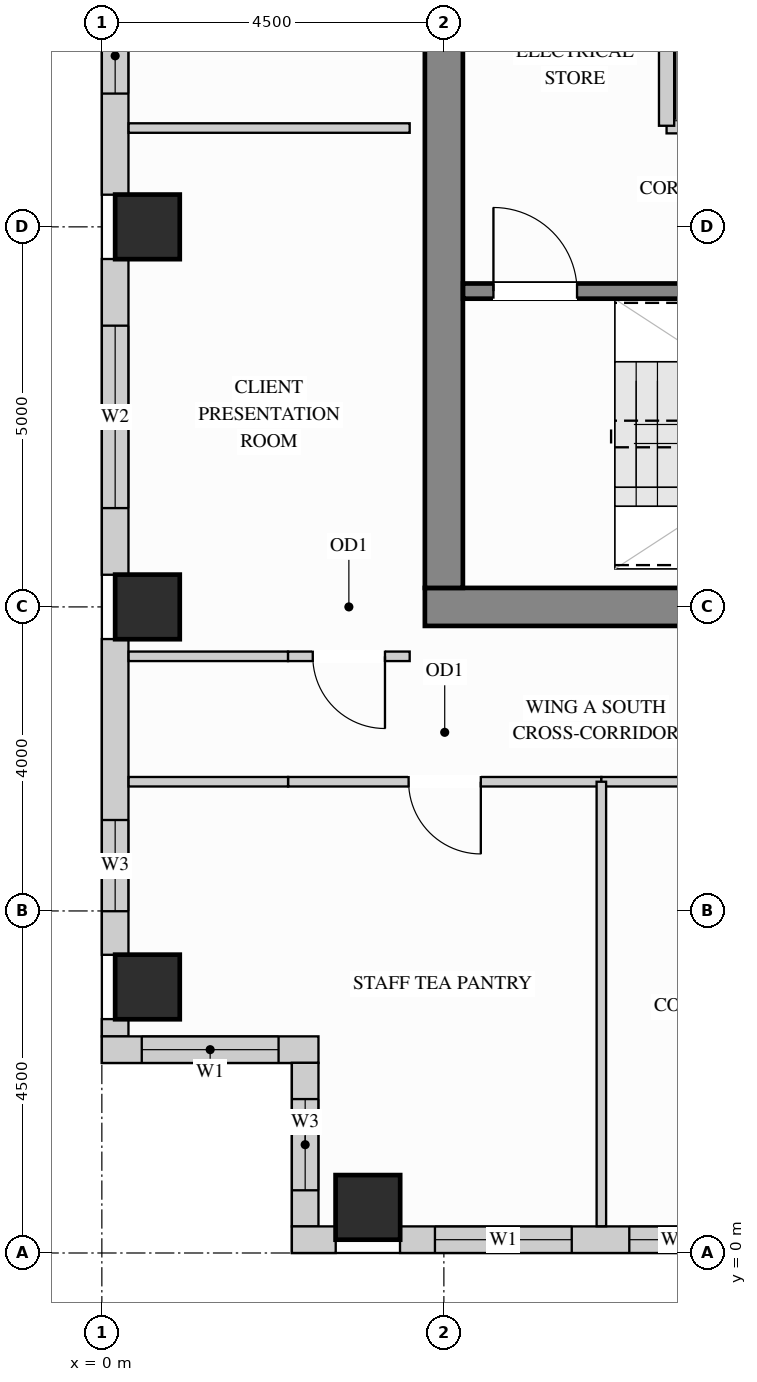
"""IFC4 building model, lengths in metres.
Left out: names, types, materials, properties, quantities, classifications, styles, units other than length and angle.
Written with IfcOpenShell. Run it as: python <this file> out.ifc"""

import sys

from ifc_helpers import new_model, si_unit, direction, frame, frame_2d, origin, origin_2d, place, context, subcontext, project, spatial, rectangle, extrude, source, transform, mapped, element, fill, save


model = new_model("IFC4")
c1 = context("Model", 3, precision=1e-05, world=origin(), true_north=direction((0.0, 1.0)))
c2 = subcontext(c1, "Body", "Model", "MODEL_VIEW")
j1 = project(units=[si_unit("LENGTHUNIT", "METRE"), si_unit("PLANEANGLEUNIT", "RADIAN")], contexts=[c1])
p1 = place(None, origin())
s1 = spatial("IfcSite", under=j1, at=p1, CompositionType="ELEMENT")
p2 = place(p1, origin())
s2 = spatial("IfcBuilding", under=s1, at=p2, CompositionType="ELEMENT")
p3 = place(p2, frame((0.0, 0.0, 219.6)))
s3 = spatial("IfcBuildingStorey", under=s2, at=p3, CompositionType="ELEMENT", Elevation=219.6)
m1 = source(origin(), c2, "Body", "SweptSolid", [
    extrude(rectangle(XDim=0.85, YDim=0.85, at=origin_2d()), origin(), (0.0, 0.0, 1.0), 3.4),
])
for number, where, z_axis, x_axis in (
    (1, (3.5, 0.6, 0.0), (0.0, 0.0, 1.0), (1.0, 0.0, 0.0)),
    (2, (0.6, 13.5, 0.0), (0.0, 0.0, 1.0), (1.0, 0.0, 0.0)),
    (3, (0.6, 3.5, 0.0), (0.0, 0.0, 1.0), (1.0, 0.0, 0.0)),
    (4, (0.6, 8.5, 0.0), (0.0, 0.0, 1.0), (1.0, 0.0, 0.0)),
):
    element("IfcColumn", number, at=place(p3, frame(where, z_axis=z_axis, x_axis=x_axis)), inside=s3, PredefinedType="COLUMN", context=c2, shape_type="MappedRepresentation", body=[
        mapped(m1, transform((0.0, 0.0, 0.0), x_axis=(1.0, 0.0, 0.0), y_axis=(0.0, 1.0, 0.0), z_axis=(0.0, 0.0, 1.0))),
    ])
m2 = source(origin(), c2, "Body", "SweptSolid", [
    extrude(rectangle(XDim=10.5, YDim=0.5, at=frame_2d((5.25, 0.0))), origin(), (0.0, 0.0, 1.0), 3.4),
])
p4 = place(p3, frame((4.25, 8.5, 0.0), z_axis=(0.0, 0.0, 1.0), x_axis=(1.0, 0.0, 0.0)))
e5 = element("IfcWall", 5, at=p4, inside=s3, PredefinedType="SHEAR", context=c2, shape_type="MappedRepresentation", body=[
    mapped(m2, transform((0.0, 0.0, 0.0), x_axis=(1.0, 0.0, 0.0), y_axis=(0.0, 1.0, 0.0), z_axis=(0.0, 0.0, 1.0))),
])
m3 = source(origin(), c2, "Body", "SweptSolid", [
    extrude(rectangle(XDim=20.5, YDim=0.5, at=frame_2d((10.25, 0.0))), origin(), (0.0, 0.0, 1.0), 3.4),
])
p5 = place(p3, frame((4.5, 8.75, 0.0), z_axis=(0.0, 0.0, 1.0), x_axis=(0.0, 1.0, 0.0)))
e6 = element("IfcWall", 6, at=p5, inside=s3, PredefinedType="SHEAR", context=c2, shape_type="MappedRepresentation", body=[
    mapped(m3, transform((0.0, 0.0, 0.0), x_axis=(1.0, 0.0, 0.0), y_axis=(0.0, 1.0, 0.0), z_axis=(0.0, 0.0, 1.0))),
])
p6 = place(p3, frame((0.175, 17.577, 0.0), z_axis=(0.0, 0.0, 1.0), x_axis=(0.0, -1.0, 0.0)))
e7 = element("IfcWall", 7, at=p6, inside=s3, PredefinedType="SOLIDWALL", context=c2, shape_type="SweptSolid", body=[
    extrude(rectangle(XDim=3.654, YDim=0.35, at=frame_2d((1.827, 0.0))), origin(), (0.0, 0.0, 1.0), 3.385),
])
p7 = place(p6, frame((0.523, 0.0, 0.78)))
e8 = element("IfcOpeningElement", 8, at=p7, cuts=e7, PredefinedType="OPENING", context=c2, shape_type="SweptSolid", body=[
    extrude(rectangle(XDim=1.8, YDim=2.1, at=frame_2d((0.9, 1.05))), frame((0.0, 0.185, 0.0), z_axis=(0.0, -1.0, 0.0), x_axis=(1.0, 0.0, 0.0)), (0.0, 0.0, 1.0), 0.37),
])
p8 = place(p3, frame((0.175, 13.077, 0.0), z_axis=(0.0, 0.0, 1.0), x_axis=(0.0, -1.0, 0.0)))
e9 = element("IfcWall", 9, at=p8, inside=s3, PredefinedType="SOLIDWALL", context=c2, shape_type="SweptSolid", body=[
    extrude(rectangle(XDim=4.154, YDim=0.35, at=frame_2d((2.077, 0.0))), origin(), (0.0, 0.0, 1.0), 3.385),
])
p9 = place(p8, frame((0.877, 0.0, 0.78)))
e10 = element("IfcOpeningElement", 10, at=p9, cuts=e9, PredefinedType="OPENING", context=c2, shape_type="SweptSolid", body=[
    extrude(rectangle(XDim=2.4, YDim=2.1, at=frame_2d((1.2, 1.05))), frame((0.0, 0.185, 0.0), z_axis=(0.0, -1.0, 0.0), x_axis=(1.0, 0.0, 0.0)), (0.0, 0.0, 1.0), 0.37),
])
p10 = place(p3, frame((0.175, 8.077, 0.0), z_axis=(0.0, 0.0, 1.0), x_axis=(0.0, -1.0, 0.0)))
e11 = element("IfcWall", 11, at=p10, inside=s3, PredefinedType="SOLIDWALL", context=c2, shape_type="SweptSolid", body=[
    extrude(rectangle(XDim=4.154, YDim=0.35, at=frame_2d((2.077, 0.0))), origin(), (0.0, 0.0, 1.0), 3.385),
])
p11 = place(p10, frame((2.381, 0.0, 0.78)))
e12 = element("IfcOpeningElement", 12, at=p11, cuts=e11, PredefinedType="OPENING", context=c2, shape_type="SweptSolid", body=[
    extrude(rectangle(XDim=1.2, YDim=2.1, at=frame_2d((0.6, 1.05))), frame((0.0, 0.185, 0.0), z_axis=(0.0, -1.0, 0.0), x_axis=(1.0, 0.0, 0.0)), (0.0, 0.0, 1.0), 0.37),
])
m4 = source(origin(), c2, "Body", "SweptSolid", [
    extrude(rectangle(XDim=0.229, YDim=0.35, at=frame_2d((0.115, 0.0))), origin(), (0.0, 0.0, 1.0), 3.385),
])
p12 = place(p3, frame((0.175, 3.077, 0.0), z_axis=(0.0, 0.0, 1.0), x_axis=(0.0, -1.0, 0.0)))
e13 = element("IfcWall", 13, at=p12, inside=s3, PredefinedType="SOLIDWALL", context=c2, shape_type="MappedRepresentation", body=[
    mapped(m4, transform((0.0, 0.0, 0.0), x_axis=(1.0, 0.0, 0.0), y_axis=(0.0, 1.0, 0.0), z_axis=(0.0, 0.0, 1.0))),
])
p13 = place(p3, frame((0.0, 2.675, 0.0), z_axis=(0.0, 0.0, 1.0), x_axis=(1.0, 0.0, 0.0)))
e14 = element("IfcWall", 14, at=p13, inside=s3, PredefinedType="SOLIDWALL", context=c2, shape_type="SweptSolid", body=[
    extrude(rectangle(XDim=2.85, YDim=0.35, at=frame_2d((1.425, 0.0))), origin(), (0.0, 0.0, 1.0), 3.385),
])
p14 = place(p13, frame((0.525, 0.0, 0.78)))
e15 = element("IfcOpeningElement", 15, at=p14, cuts=e14, PredefinedType="OPENING", context=c2, shape_type="SweptSolid", body=[
    extrude(rectangle(XDim=1.8, YDim=2.1, at=frame_2d((0.9, 1.05))), frame((0.0, 0.185, 0.0), z_axis=(0.0, -1.0, 0.0), x_axis=(1.0, 0.0, 0.0)), (0.0, 0.0, 1.0), 0.37),
])
p15 = place(p3, frame((2.675, 2.502, 0.0), z_axis=(0.0, 0.0, 1.0), x_axis=(0.0, -1.0, 0.0)))
e16 = element("IfcWall", 16, at=p15, inside=s3, PredefinedType="SOLIDWALL", context=c2, shape_type="SweptSolid", body=[
    extrude(rectangle(XDim=2.154, YDim=0.35, at=frame_2d((1.077, 0.0))), origin(), (0.0, 0.0, 1.0), 3.385),
])
p16 = place(p15, frame((0.477, 0.0, 0.78)))
e17 = element("IfcOpeningElement", 17, at=p16, cuts=e16, PredefinedType="OPENING", context=c2, shape_type="SweptSolid", body=[
    extrude(rectangle(XDim=1.2, YDim=2.1, at=frame_2d((0.6, 1.05))), frame((0.0, 0.185, 0.0), z_axis=(0.0, -1.0, 0.0), x_axis=(1.0, 0.0, 0.0)), (0.0, 0.0, 1.0), 0.37),
])
m5 = source(origin(), c2, "Body", "SweptSolid", [
    extrude(rectangle(XDim=0.577, YDim=0.35, at=frame_2d((0.289, 0.0))), origin(), (0.0, 0.0, 1.0), 3.385),
])
p17 = place(p3, frame((2.5, 0.175, 0.0), z_axis=(0.0, 0.0, 1.0), x_axis=(1.0, 0.0, 0.0)))
e18 = element("IfcWall", 18, at=p17, inside=s3, PredefinedType="SOLIDWALL", context=c2, shape_type="MappedRepresentation", body=[
    mapped(m5, transform((0.0, 0.0, 0.0), x_axis=(1.0, 0.0, 0.0), y_axis=(0.0, 1.0, 0.0), z_axis=(0.0, 0.0, 1.0))),
])
p18 = place(p3, frame((3.923, 0.175, 0.0), z_axis=(0.0, 0.0, 1.0), x_axis=(1.0, 0.0, 0.0)))
e19 = element("IfcWall", 19, at=p18, inside=s3, PredefinedType="SOLIDWALL", context=c2, shape_type="SweptSolid", body=[
    extrude(rectangle(XDim=4.654, YDim=0.35, at=frame_2d((2.327, 0.0))), origin(), (0.0, 0.0, 1.0), 3.385),
])
p19 = place(p18, frame((0.459, 0.0, 0.78)))
e20 = element("IfcOpeningElement", 20, at=p19, cuts=e19, PredefinedType="OPENING", context=c2, shape_type="SweptSolid", body=[
    extrude(rectangle(XDim=1.8, YDim=2.1, at=frame_2d((0.9, 1.05))), frame((0.0, 0.185, 0.0), z_axis=(0.0, -1.0, 0.0), x_axis=(1.0, 0.0, 0.0)), (0.0, 0.0, 1.0), 0.37),
])
p20 = place(p18, frame((3.017, 0.0, 0.78)))
e21 = element("IfcOpeningElement", 21, at=p20, cuts=e19, PredefinedType="OPENING", context=c2, shape_type="SweptSolid", body=[
    extrude(rectangle(XDim=1.2, YDim=2.1, at=frame_2d((0.6, 1.05))), frame((0.0, 0.185, 0.0), z_axis=(0.0, -1.0, 0.0), x_axis=(1.0, 0.0, 0.0)), (0.0, 0.0, 1.0), 0.37),
])
m6 = source(origin(), c2, "Body", "SweptSolid", [
    extrude(rectangle(XDim=2.098, YDim=0.125, at=frame_2d((1.049, 0.0))), origin(), (0.0, 0.0, 1.0), 3.385),
])
p21 = place(p3, frame((0.352, 7.85, 0.0), z_axis=(0.0, 0.0, 1.0), x_axis=(1.0, 0.0, 0.0)))
e22 = element("IfcWall", 22, at=p21, inside=s3, PredefinedType="PARTITIONING", context=c2, shape_type="MappedRepresentation", body=[
    mapped(m6, transform((0.0, 0.0, 0.0), x_axis=(1.0, 0.0, 0.0), y_axis=(0.0, 1.0, 0.0), z_axis=(0.0, 0.0, 1.0))),
])
p22 = place(p3, frame((2.45, 7.85, 0.0), z_axis=(0.0, 0.0, 1.0), x_axis=(1.0, 0.0, 0.0)))
e23 = element("IfcWall", 23, at=p22, inside=s3, PredefinedType="PARTITIONING", context=c2, shape_type="SweptSolid", body=[
    extrude(rectangle(XDim=1.6, YDim=0.125, at=frame_2d((0.8, 0.0))), origin(), (0.0, 0.0, 1.0), 3.385),
])
p23 = place(p22, frame((0.325, 0.0, 0.0)))
e24 = element("IfcOpeningElement", 24, at=p23, cuts=e23, PredefinedType="OPENING", context=c2, shape_type="SweptSolid", body=[
    extrude(rectangle(XDim=0.95, YDim=2.15, at=frame_2d((0.475, 1.075))), frame((0.0, 0.073, 0.0), z_axis=(0.0, -1.0, 0.0), x_axis=(1.0, 0.0, 0.0)), (0.0, 0.0, 1.0), 0.145),
])
p24 = place(p3, frame((2.45, 6.2, 0.0), z_axis=(0.0, 0.0, 1.0), x_axis=(1.0, 0.0, 0.0)))
e25 = element("IfcWall", 25, at=p24, inside=s3, PredefinedType="PARTITIONING", context=c2, shape_type="SweptSolid", body=[
    extrude(rectangle(XDim=4.122, YDim=0.125, at=frame_2d((2.061, 0.0))), origin(), (0.0, 0.0, 1.0), 2.848),
])
p25 = place(p24, frame((1.586, 0.0, 0.0)))
e26 = element("IfcOpeningElement", 26, at=p25, cuts=e25, PredefinedType="OPENING", context=c2, shape_type="SweptSolid", body=[
    extrude(rectangle(XDim=0.95, YDim=2.15, at=frame_2d((0.475, 1.075))), frame((0.0, 0.073, 0.0), z_axis=(0.0, -1.0, 0.0), x_axis=(1.0, 0.0, 0.0)), (0.0, 0.0, 1.0), 0.145),
])
p26 = place(p3, frame((6.572, 6.2, 0.0), z_axis=(0.0, 0.0, 1.0), x_axis=(1.0, 0.0, 0.0)))
e27 = element("IfcWall", 27, at=p26, inside=s3, PredefinedType="PARTITIONING", context=c2, shape_type="SweptSolid", body=[
    extrude(rectangle(XDim=3.972, YDim=0.125, at=frame_2d((1.986, 0.0))), origin(), (0.0, 0.0, 1.0), 2.848),
])
p27 = place(p26, frame((1.511, 0.0, 0.0)))
e28 = element("IfcOpeningElement", 28, at=p27, cuts=e27, PredefinedType="OPENING", context=c2, shape_type="SweptSolid", body=[
    extrude(rectangle(XDim=0.95, YDim=2.15, at=frame_2d((0.475, 1.075))), frame((0.0, 0.073, 0.0), z_axis=(0.0, -1.0, 0.0), x_axis=(1.0, 0.0, 0.0)), (0.0, 0.0, 1.0), 0.145),
])
m7 = source(origin(), c2, "Body", "SweptSolid", [
    extrude(rectangle(XDim=2.098, YDim=0.125, at=frame_2d((1.049, 0.0))), origin(), (0.0, 0.0, 1.0), 2.848),
])
p28 = place(p3, frame((0.352, 6.2, 0.0), z_axis=(0.0, 0.0, 1.0), x_axis=(1.0, 0.0, 0.0)))
e29 = element("IfcWall", 29, at=p28, inside=s3, PredefinedType="PARTITIONING", context=c2, shape_type="MappedRepresentation", body=[
    mapped(m7, transform((0.0, 0.0, 0.0), x_axis=(1.0, 0.0, 0.0), y_axis=(0.0, 1.0, 0.0), z_axis=(0.0, 0.0, 1.0))),
])
m8 = source(origin(), c2, "Body", "SweptSolid", [
    extrude(rectangle(XDim=5.848, YDim=0.125, at=frame_2d((2.924, 0.0))), origin(), (0.0, 0.0, 1.0), 3.385),
])
p29 = place(p3, frame((6.572, 0.352, 0.0), z_axis=(0.0, 0.0, 1.0), x_axis=(0.0, 1.0, 0.0)))
e30 = element("IfcWall", 30, at=p29, inside=s3, PredefinedType="PARTITIONING", context=c2, shape_type="MappedRepresentation", body=[
    mapped(m8, transform((0.0, 0.0, 0.0), x_axis=(1.0, 0.0, 0.0), y_axis=(0.0, 1.0, 0.0), z_axis=(0.0, 0.0, 1.0))),
])
m9 = source(origin(), c2, "Body", "SweptSolid", [
    extrude(rectangle(XDim=3.698, YDim=0.125, at=frame_2d((1.849, 0.0))), origin(), (0.0, 0.0, 1.0), 3.385),
])
p30 = place(p3, frame((0.352, 14.8, 0.0), z_axis=(0.0, 0.0, 1.0), x_axis=(1.0, 0.0, 0.0)))
e31 = element("IfcWall", 31, at=p30, inside=s3, PredefinedType="PARTITIONING", context=c2, shape_type="MappedRepresentation", body=[
    mapped(m9, transform((0.0, 0.0, 0.0), x_axis=(1.0, 0.0, 0.0), y_axis=(0.0, 1.0, 0.0), z_axis=(0.0, 0.0, 1.0))),
])
m10 = source(origin(), c2, "Body", "SweptSolid", [
    extrude(rectangle(XDim=2.04, YDim=0.2, at=frame_2d((1.02, 0.0))), origin(), (0.0, 0.0, 1.0), 3.385),
])
p31 = place(p3, frame((7.43, 14.83, 0.0), z_axis=(0.0, 0.0, 1.0), x_axis=(1.0, 0.0, 0.0)))
e32 = element("IfcWall", 32, at=p31, inside=s3, PredefinedType="PARTITIONING", context=c2, shape_type="MappedRepresentation", body=[
    mapped(m10, transform((0.0, 0.0, 0.0), x_axis=(1.0, 0.0, 0.0), y_axis=(0.0, 1.0, 0.0), z_axis=(0.0, 0.0, 1.0))),
])
m11 = source(origin(), c2, "Body", "SweptSolid", [
    extrude(rectangle(XDim=2.84, YDim=0.2, at=frame_2d((1.42, 0.0))), origin(), (0.0, 0.0, 1.0), 3.385),
])
p32 = place(p3, frame((7.43, 14.83, 0.0), z_axis=(0.0, 0.0, 1.0), x_axis=(0.0, 1.0, 0.0)))
e33 = element("IfcWall", 33, at=p32, inside=s3, PredefinedType="PARTITIONING", context=c2, shape_type="MappedRepresentation", body=[
    mapped(m11, transform((0.0, 0.0, 0.0), x_axis=(1.0, 0.0, 0.0), y_axis=(0.0, 1.0, 0.0), z_axis=(0.0, 0.0, 1.0))),
])
p33 = place(p3, frame((4.752, 12.655, 0.0), z_axis=(0.0, 0.0, 1.0), x_axis=(1.0, 0.0, 0.0)))
e34 = element("IfcWall", 34, at=p33, inside=s3, PredefinedType="SHEAR", context=c2, shape_type="SweptSolid", body=[
    extrude(rectangle(XDim=7.653, YDim=0.2, at=frame_2d((3.827, 0.0))), origin(), (0.0, 0.0, 1.0), 3.4),
])
p34 = place(p33, frame((0.4, 0.0, 0.0)))
e35 = element("IfcOpeningElement", 35, at=p34, cuts=e34, PredefinedType="OPENING", context=c2, shape_type="SweptSolid", body=[
    extrude(rectangle(XDim=1.1, YDim=2.15, at=frame_2d((0.55, 1.075))), frame((0.0, 0.11, 0.0), z_axis=(0.0, -1.0, 0.0), x_axis=(1.0, 0.0, 0.0)), (0.0, 0.0, 1.0), 0.22),
])
m12 = source(origin(), c2, "Body", "SweptSolid", [
    extrude(rectangle(XDim=0.95, YDim=2.15, at=frame_2d((0.475, 1.075))), frame((0.0, 0.025, 0.0), z_axis=(0.0, -1.0, 0.0), x_axis=(1.0, 0.0, 0.0)), (0.0, 0.0, 1.0), 0.05),
])
p35 = place(p25, origin())
e36 = element("IfcDoor", 36, at=p35, inside=s3, OperationType="SINGLE_SWING_RIGHT", PredefinedType="DOOR", context=c2, shape_type="MappedRepresentation", body=[
    mapped(m12, transform((0.0, 0.0, 0.0), x_axis=(1.0, 0.0, 0.0), y_axis=(0.0, 1.0, 0.0), z_axis=(0.0, 0.0, 1.0))),
])
fill(e26, e36)
p36 = place(p23, origin())
e37 = element("IfcDoor", 37, at=p36, inside=s3, OperationType="SINGLE_SWING_RIGHT", PredefinedType="DOOR", context=c2, shape_type="MappedRepresentation", body=[
    mapped(m12, transform((0.0, 0.0, 0.0), x_axis=(1.0, 0.0, 0.0), y_axis=(0.0, 1.0, 0.0), z_axis=(0.0, 0.0, 1.0))),
])
fill(e24, e37)
m13 = source(origin(), c2, "Body", "SweptSolid", [
    extrude(rectangle(XDim=1.1, YDim=2.15, at=frame_2d((0.55, 1.075))), frame((0.0, 0.025, 0.0), z_axis=(0.0, -1.0, 0.0), x_axis=(1.0, 0.0, 0.0)), (0.0, 0.0, 1.0), 0.05),
])
p37 = place(p34, origin())
e38 = element("IfcDoor", 38, at=p37, inside=s3, OperationType="SINGLE_SWING_LEFT", PredefinedType="DOOR", context=c2, shape_type="MappedRepresentation", body=[
    mapped(m13, transform((0.0, 0.0, 0.0), x_axis=(1.0, 0.0, 0.0), y_axis=(0.0, 1.0, 0.0), z_axis=(0.0, 0.0, 1.0))),
])
fill(e35, e38)
m14 = source(origin(), c2, "Body", "SweptSolid", [
    extrude(rectangle(XDim=1.8, YDim=2.1, at=frame_2d((0.9, 1.05))), frame((0.0, 0.03, 0.0), z_axis=(0.0, -1.0, 0.0), x_axis=(1.0, 0.0, 0.0)), (0.0, 0.0, 1.0), 0.06),
])
p38 = place(p7, origin())
e39 = element("IfcWindow", 39, at=p38, inside=s3, PartitioningType="SINGLE_PANEL", PredefinedType="WINDOW", context=c2, shape_type="MappedRepresentation", body=[
    mapped(m14, transform((0.0, 0.0, 0.0), x_axis=(1.0, 0.0, 0.0), y_axis=(0.0, 1.0, 0.0), z_axis=(0.0, 0.0, 1.0))),
])
fill(e8, e39)
p39 = place(p14, origin())
e40 = element("IfcWindow", 40, at=p39, inside=s3, PartitioningType="SINGLE_PANEL", PredefinedType="WINDOW", context=c2, shape_type="MappedRepresentation", body=[
    mapped(m14, transform((0.0, 0.0, 0.0), x_axis=(1.0, 0.0, 0.0), y_axis=(0.0, 1.0, 0.0), z_axis=(0.0, 0.0, 1.0))),
])
fill(e15, e40)
p40 = place(p19, origin())
e41 = element("IfcWindow", 41, at=p40, inside=s3, PartitioningType="SINGLE_PANEL", PredefinedType="WINDOW", context=c2, shape_type="MappedRepresentation", body=[
    mapped(m14, transform((0.0, 0.0, 0.0), x_axis=(1.0, 0.0, 0.0), y_axis=(0.0, 1.0, 0.0), z_axis=(0.0, 0.0, 1.0))),
])
fill(e20, e41)
m15 = source(origin(), c2, "Body", "SweptSolid", [
    extrude(rectangle(XDim=2.4, YDim=2.1, at=frame_2d((1.2, 1.05))), frame((0.0, 0.03, 0.0), z_axis=(0.0, -1.0, 0.0), x_axis=(1.0, 0.0, 0.0)), (0.0, 0.0, 1.0), 0.06),
])
p41 = place(p9, origin())
e42 = element("IfcWindow", 42, at=p41, inside=s3, PartitioningType="SINGLE_PANEL", PredefinedType="WINDOW", context=c2, shape_type="MappedRepresentation", body=[
    mapped(m15, transform((0.0, 0.0, 0.0), x_axis=(1.0, 0.0, 0.0), y_axis=(0.0, 1.0, 0.0), z_axis=(0.0, 0.0, 1.0))),
])
fill(e10, e42)
m16 = source(origin(), c2, "Body", "SweptSolid", [
    extrude(rectangle(XDim=1.2, YDim=2.1, at=frame_2d((0.6, 1.05))), frame((0.0, 0.03, 0.0), z_axis=(0.0, -1.0, 0.0), x_axis=(1.0, 0.0, 0.0)), (0.0, 0.0, 1.0), 0.06),
])
p42 = place(p11, origin())
e43 = element("IfcWindow", 43, at=p42, inside=s3, PartitioningType="SINGLE_PANEL", PredefinedType="WINDOW", context=c2, shape_type="MappedRepresentation", body=[
    mapped(m16, transform((0.0, 0.0, 0.0), x_axis=(1.0, 0.0, 0.0), y_axis=(0.0, 1.0, 0.0), z_axis=(0.0, 0.0, 1.0))),
])
fill(e12, e43)
p43 = place(p16, origin())
e44 = element("IfcWindow", 44, at=p43, inside=s3, PartitioningType="SINGLE_PANEL", PredefinedType="WINDOW", context=c2, shape_type="MappedRepresentation", body=[
    mapped(m16, transform((0.0, 0.0, 0.0), x_axis=(1.0, 0.0, 0.0), y_axis=(0.0, 1.0, 0.0), z_axis=(0.0, 0.0, 1.0))),
])
fill(e17, e44)
p44 = place(p20, origin())
e45 = element("IfcWindow", 45, at=p44, inside=s3, PartitioningType="SINGLE_PANEL", PredefinedType="WINDOW", context=c2, shape_type="MappedRepresentation", body=[
    mapped(m16, transform((0.0, 0.0, 0.0), x_axis=(1.0, 0.0, 0.0), y_axis=(0.0, 1.0, 0.0), z_axis=(0.0, 0.0, 1.0))),
])
fill(e21, e45)
save(model, sys.argv[1])
